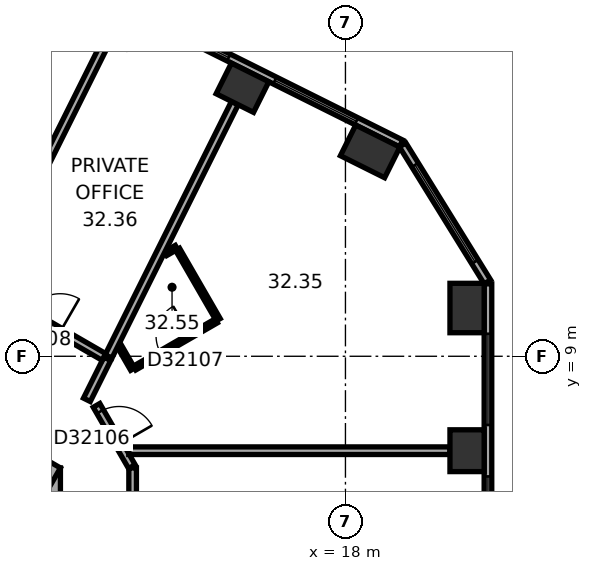
"""IFC4 building model, lengths in metres.
Left out: names, types, materials, properties, quantities, classifications, styles, units other than length and angle.
Written with IfcOpenShell. Run it as: python <this file> out.ifc"""

import sys

from ifc_helpers import new_model, si_unit, direction, frame, frame_2d, origin, origin_2d, place, context, subcontext, project, spatial, rectangle, extrude, element, fill, save


model = new_model("IFC4")
c1 = context("Model", 3, precision=1e-05, world=origin(), true_north=direction((0.0, 1.0)))
c2 = subcontext(c1, "Body", "Model", "MODEL_VIEW")
j1 = project(units=[si_unit("LENGTHUNIT", "METRE"), si_unit("PLANEANGLEUNIT", "RADIAN")], contexts=[c1])
p1 = place(None, origin())
s1 = spatial("IfcSite", under=j1, at=p1, CompositionType="ELEMENT")
p2 = place(p1, origin())
s2 = spatial("IfcBuilding", under=s1, at=p2, CompositionType="ELEMENT")
p3 = place(p2, frame((0.0, 0.0, 131.8)))
s3 = spatial("IfcBuildingStorey", under=s2, at=p3, CompositionType="ELEMENT", Elevation=131.8)
p4 = place(p3, frame((21.2, 6.515, 0.0), z_axis=(0.0, 0.0, 1.0), x_axis=(0.0, 1.0, 0.0)))
e1 = element("IfcColumn", 1, at=p4, inside=s3, PredefinedType="COLUMN", context=c2, shape_type="SweptSolid", body=[
    extrude(rectangle(XDim=1.1, YDim=0.9, at=origin_2d()), origin(), (0.0, 0.0, 1.0), 3.7),
])
for number, where, z_axis, x_axis in (
    (2, (21.2, 10.27, 0.0), (0.0, 0.0, 1.0), (0.0, 1.0, 0.0)),
    (3, (18.65, 14.39, 0.0), (0.0, 0.0, 1.0), (-0.895, 0.446, 0.0)),
):
    element("IfcColumn", number, at=place(p3, frame(where, z_axis=z_axis, x_axis=x_axis)), inside=s3, PredefinedType="COLUMN", context=c2, shape_type="SweptSolid", body=[
        extrude(rectangle(XDim=1.3, YDim=0.9, at=origin_2d()), origin(), (0.0, 0.0, 1.0), 3.7),
    ])
p5 = place(p3, frame((15.29, 16.065, 0.0), z_axis=(0.0, 0.0, 1.0), x_axis=(-0.894934361602, 0.44619781311, 0.0)))
e4 = element("IfcColumn", 4, at=p5, inside=s3, PredefinedType="COLUMN", context=c2, shape_type="SweptSolid", body=[
    extrude(rectangle(XDim=1.1, YDim=0.9, at=origin_2d()), origin(), (0.0, 0.0, 1.0), 3.7),
])
p6 = place(p3, frame((10.0, -6.062, 0.0), z_axis=(0.0, 0.0, 1.0), x_axis=(0.0, 1.0, 0.0)))
e5 = element("IfcWall", 5, at=p6, inside=s3, PredefinedType="SHEAR", context=c2, shape_type="SweptSolid", body=[
    extrude(rectangle(XDim=12.125, YDim=1.0, at=frame_2d((6.062, 0.0))), origin(), (0.0, 0.0, 1.0), 3.7),
])
p7 = place(p6, frame((6.262, 0.0, 0.0)))
e6 = element("IfcOpeningElement", 6, at=p7, cuts=e5, PredefinedType="OPENING", context=c2, shape_type="SweptSolid", body=[
    extrude(rectangle(XDim=1.5, YDim=2.1, at=frame_2d((0.75, 1.05))), frame((0.0, 0.51, 0.0), z_axis=(0.0, -1.0, 0.0), x_axis=(1.0, 0.0, 0.0)), (0.0, 0.0, 1.0), 1.02),
])
p8 = place(p6, frame((1.712, 0.0, 0.0)))
e7 = element("IfcOpeningElement", 7, at=p8, cuts=e5, PredefinedType="OPENING", context=c2, shape_type="SweptSolid", body=[
    extrude(rectangle(XDim=1.1, YDim=2.1, at=frame_2d((0.55, 1.05))), frame((0.0, 0.51, 0.0), z_axis=(0.0, -1.0, 0.0), x_axis=(1.0, 0.0, 0.0)), (0.0, 0.0, 1.0), 1.02),
])
p9 = place(p6, frame((4.312, 0.0, 0.0)))
e8 = element("IfcOpeningElement", 8, at=p9, cuts=e5, PredefinedType="OPENING", context=c2, shape_type="SweptSolid", body=[
    extrude(rectangle(XDim=1.1, YDim=2.1, at=frame_2d((0.55, 1.05))), frame((0.0, 0.51, 0.0), z_axis=(0.0, -1.0, 0.0), x_axis=(1.0, 0.0, 0.0)), (0.0, 0.0, 1.0), 1.02),
])
p10 = place(p3, frame((10.25, 5.629, 0.0), z_axis=(0.0, 0.0, 1.0), x_axis=(-0.866022616891, 0.50000482701, 0.0)))
e9 = element("IfcWall", 9, at=p10, inside=s3, PredefinedType="SHEAR", context=c2, shape_type="SweptSolid", body=[
    extrude(rectangle(XDim=12.125, YDim=1.0, at=frame_2d((6.062, 0.0))), origin(), (0.0, 0.0, 1.0), 3.7),
])
p11 = place(p10, frame((2.612, 0.0, 0.0)))
e10 = element("IfcOpeningElement", 10, at=p11, cuts=e9, PredefinedType="OPENING", context=c2, shape_type="SweptSolid", body=[
    extrude(rectangle(XDim=1.1, YDim=2.1, at=frame_2d((0.55, 1.05))), frame((0.0, 0.51, 0.0), z_axis=(0.0, -1.0, 0.0), x_axis=(1.0, 0.0, 0.0)), (0.0, 0.0, 1.0), 1.02),
])
p12 = place(p10, frame((5.212, 0.0, 0.0)))
e11 = element("IfcOpeningElement", 11, at=p12, cuts=e9, PredefinedType="OPENING", context=c2, shape_type="SweptSolid", body=[
    extrude(rectangle(XDim=1.1, YDim=2.1, at=frame_2d((0.55, 1.05))), frame((0.0, 0.51, 0.0), z_axis=(0.0, -1.0, 0.0), x_axis=(1.0, 0.0, 0.0)), (0.0, 0.0, 1.0), 1.02),
])
p13 = place(p10, frame((7.812, 0.0, 0.0)))
e12 = element("IfcOpeningElement", 12, at=p13, cuts=e9, PredefinedType="OPENING", context=c2, shape_type="SweptSolid", body=[
    extrude(rectangle(XDim=1.1, YDim=2.1, at=frame_2d((0.55, 1.05))), frame((0.0, 0.51, 0.0), z_axis=(0.0, -1.0, 0.0), x_axis=(1.0, 0.0, 0.0)), (0.0, 0.0, 1.0), 1.02),
])
p14 = place(p3, frame((21.75, -9.138, 0.0), z_axis=(0.0, 0.0, 1.0), x_axis=(0.0, 1.0, 0.0)))
e13 = element("IfcWall", 13, at=p14, inside=s3, PredefinedType="STANDARD", context=c2, shape_type="SweptSolid", body=[
    extrude(rectangle(XDim=20.044, YDim=0.2, at=frame_2d((10.022, 0.0))), origin(), (0.0, 0.0, 1.0), 3.7),
])
p15 = place(p14, frame((1.314, 0.0, 0.9)))
e14 = element("IfcOpeningElement", 14, at=p15, cuts=e13, PredefinedType="OPENING", context=c2, shape_type="SweptSolid", body=[
    extrude(rectangle(XDim=2.4, YDim=2.0, at=frame_2d((1.2, 1.0))), frame((0.0, 0.11, 0.0), z_axis=(0.0, -1.0, 0.0), x_axis=(1.0, 0.0, 0.0)), (0.0, 0.0, 1.0), 0.22),
])
p16 = place(p14, frame((5.069, 0.0, 0.9)))
e15 = element("IfcOpeningElement", 15, at=p16, cuts=e13, PredefinedType="OPENING", context=c2, shape_type="SweptSolid", body=[
    extrude(rectangle(XDim=2.4, YDim=2.0, at=frame_2d((1.2, 1.0))), frame((0.0, 0.11, 0.0), z_axis=(0.0, -1.0, 0.0), x_axis=(1.0, 0.0, 0.0)), (0.0, 0.0, 1.0), 0.22),
])
p17 = place(p14, frame((8.823, 0.0, 0.9)))
e16 = element("IfcOpeningElement", 16, at=p17, cuts=e13, PredefinedType="OPENING", context=c2, shape_type="SweptSolid", body=[
    extrude(rectangle(XDim=2.4, YDim=2.0, at=frame_2d((1.2, 1.0))), frame((0.0, 0.11, 0.0), z_axis=(0.0, -1.0, 0.0), x_axis=(1.0, 0.0, 0.0)), (0.0, 0.0, 1.0), 0.22),
])
p18 = place(p14, frame((12.577, 0.0, 0.9)))
e17 = element("IfcOpeningElement", 17, at=p18, cuts=e13, PredefinedType="OPENING", context=c2, shape_type="SweptSolid", body=[
    extrude(rectangle(XDim=2.4, YDim=2.0, at=frame_2d((1.2, 1.0))), frame((0.0, 0.11, 0.0), z_axis=(0.0, -1.0, 0.0), x_axis=(1.0, 0.0, 0.0)), (0.0, 0.0, 1.0), 0.22),
])
p19 = place(p14, frame((16.331, 0.0, 0.9)))
e18 = element("IfcOpeningElement", 18, at=p19, cuts=e13, PredefinedType="OPENING", context=c2, shape_type="SweptSolid", body=[
    extrude(rectangle(XDim=2.4, YDim=2.0, at=frame_2d((1.2, 1.0))), frame((0.0, 0.11, 0.0), z_axis=(0.0, -1.0, 0.0), x_axis=(1.0, 0.0, 0.0)), (0.0, 0.0, 1.0), 0.22),
])
p20 = place(p3, frame((21.735, 10.958, 0.0), z_axis=(0.0, 0.0, 1.0), x_axis=(-0.526213807775, 0.850352296702, 0.0)))
e19 = element("IfcWall", 19, at=p20, inside=s3, PredefinedType="STANDARD", context=c2, shape_type="SweptSolid", body=[
    extrude(rectangle(XDim=4.238, YDim=0.2, at=frame_2d((2.119, 0.0))), origin(), (0.0, 0.0, 1.0), 3.7),
])
p21 = place(p20, frame((0.619, 0.0, 0.9)))
e20 = element("IfcOpeningElement", 20, at=p21, cuts=e19, PredefinedType="OPENING", context=c2, shape_type="SweptSolid", body=[
    extrude(rectangle(XDim=3.0, YDim=2.0, at=frame_2d((1.5, 1.0))), frame((0.0, 0.11, 0.0), z_axis=(0.0, -1.0, 0.0), x_axis=(1.0, 0.0, 0.0)), (0.0, 0.0, 1.0), 0.22),
])
p22 = place(p3, frame((19.464, 14.599, 0.0), z_axis=(0.0, 0.0, 1.0), x_axis=(-0.894935755043, 0.446195018289, 0.0)))
e21 = element("IfcWall", 21, at=p22, inside=s3, PredefinedType="STANDARD", context=c2, shape_type="SweptSolid", body=[
    extrude(rectangle(XDim=20.044, YDim=0.2, at=frame_2d((10.022, 0.0))), origin(), (0.0, 0.0, 1.0), 3.7),
])
p23 = place(p22, frame((1.313, 0.0, 0.9)))
e22 = element("IfcOpeningElement", 22, at=p23, cuts=e21, PredefinedType="OPENING", context=c2, shape_type="SweptSolid", body=[
    extrude(rectangle(XDim=2.4, YDim=2.0, at=frame_2d((1.2, 1.0))), frame((0.0, 0.11, 0.0), z_axis=(0.0, -1.0, 0.0), x_axis=(1.0, 0.0, 0.0)), (0.0, 0.0, 1.0), 0.22),
])
p24 = place(p22, frame((5.067, 0.0, 0.9)))
e23 = element("IfcOpeningElement", 23, at=p24, cuts=e21, PredefinedType="OPENING", context=c2, shape_type="SweptSolid", body=[
    extrude(rectangle(XDim=2.4, YDim=2.0, at=frame_2d((1.2, 1.0))), frame((0.0, 0.11, 0.0), z_axis=(0.0, -1.0, 0.0), x_axis=(1.0, 0.0, 0.0)), (0.0, 0.0, 1.0), 0.22),
])
p25 = place(p22, frame((8.821, 0.0, 0.9)))
e24 = element("IfcOpeningElement", 24, at=p25, cuts=e21, PredefinedType="OPENING", context=c2, shape_type="SweptSolid", body=[
    extrude(rectangle(XDim=2.4, YDim=2.0, at=frame_2d((1.2, 1.0))), frame((0.0, 0.11, 0.0), z_axis=(0.0, -1.0, 0.0), x_axis=(1.0, 0.0, 0.0)), (0.0, 0.0, 1.0), 0.22),
])
p26 = place(p22, frame((12.575, 0.0, 0.9)))
e25 = element("IfcOpeningElement", 25, at=p26, cuts=e21, PredefinedType="OPENING", context=c2, shape_type="SweptSolid", body=[
    extrude(rectangle(XDim=2.4, YDim=2.0, at=frame_2d((1.2, 1.0))), frame((0.0, 0.11, 0.0), z_axis=(0.0, -1.0, 0.0), x_axis=(1.0, 0.0, 0.0)), (0.0, 0.0, 1.0), 0.22),
])
p27 = place(p22, frame((16.329, 0.0, 0.9)))
e26 = element("IfcOpeningElement", 26, at=p27, cuts=e21, PredefinedType="OPENING", context=c2, shape_type="SweptSolid", body=[
    extrude(rectangle(XDim=2.4, YDim=2.0, at=frame_2d((1.2, 1.0))), frame((0.0, 0.11, 0.0), z_axis=(0.0, -1.0, 0.0), x_axis=(1.0, 0.0, 0.0)), (0.0, 0.0, 1.0), 0.22),
])
p28 = place(p3, frame((11.196, 7.854, 0.0), z_axis=(0.0, 0.0, 1.0), x_axis=(0.446241040303, 0.894912808015, 0.0)))
e27 = element("IfcWall", 27, at=p28, inside=s3, PredefinedType="PARTITIONING", context=c2, shape_type="SweptSolid", body=[
    extrude(rectangle(XDim=1.205, YDim=0.2, at=frame_2d((0.603, 0.0))), origin(), (0.0, 0.0, 1.0), 3.42),
])
p29 = place(p3, frame((11.646, 8.981, 0.0), z_axis=(0.0, 0.0, 1.0), x_axis=(-0.866027142779, 0.499996987961, 0.0)))
e28 = element("IfcWall", 28, at=p29, inside=s3, PredefinedType="PARTITIONING", context=c2, shape_type="SweptSolid", body=[
    extrude(rectangle(XDim=9.597, YDim=0.2, at=frame_2d((4.798, 0.0))), origin(), (0.0, 0.0, 1.0), 3.42),
])
p30 = place(p29, frame((1.331, 0.0, 0.0)))
e29 = element("IfcOpeningElement", 29, at=p30, cuts=e28, PredefinedType="OPENING", context=c2, shape_type="SweptSolid", body=[
    extrude(rectangle(XDim=1.0, YDim=2.1, at=frame_2d((0.5, 1.05))), frame((0.0, 0.11, 0.0), z_axis=(0.0, -1.0, 0.0), x_axis=(1.0, 0.0, 0.0)), (0.0, 0.0, 1.0), 0.22),
])
p31 = place(p29, frame((5.042, 0.0, 0.0)))
e30 = element("IfcOpeningElement", 30, at=p31, cuts=e28, PredefinedType="OPENING", context=c2, shape_type="SweptSolid", body=[
    extrude(rectangle(XDim=1.0, YDim=2.1, at=frame_2d((0.5, 1.05))), frame((0.0, 0.11, 0.0), z_axis=(0.0, -1.0, 0.0), x_axis=(1.0, 0.0, 0.0)), (0.0, 0.0, 1.0), 0.22),
])
p32 = place(p29, frame((8.01, 0.0, 0.0)))
e31 = element("IfcOpeningElement", 31, at=p32, cuts=e28, PredefinedType="OPENING", context=c2, shape_type="SweptSolid", body=[
    extrude(rectangle(XDim=1.0, YDim=2.1, at=frame_2d((0.5, 1.05))), frame((0.0, 0.11, 0.0), z_axis=(0.0, -1.0, 0.0), x_axis=(1.0, 0.0, 0.0)), (0.0, 0.0, 1.0), 0.22),
])
p33 = place(p3, frame((11.73, 17.338, 0.0), z_axis=(0.0, 0.0, 1.0), x_axis=(-0.446193589186, -0.894936467561, 0.0)))
e32 = element("IfcWall", 32, at=p33, inside=s3, PredefinedType="PARTITIONING", context=c2, shape_type="SweptSolid", body=[
    extrude(rectangle(XDim=7.183, YDim=0.2, at=frame_2d((3.591, 0.0))), origin(), (0.0, 0.0, 1.0), 2.87),
])
p34 = place(p3, frame((12.38, 6.097, 0.0), z_axis=(0.0, 0.0, 1.0), x_axis=(-0.499964847546, 0.866045698112, 0.0)))
e33 = element("IfcWall", 33, at=p34, inside=s3, PredefinedType="PARTITIONING", context=c2, shape_type="SweptSolid", body=[
    extrude(rectangle(XDim=1.86, YDim=0.2, at=frame_2d((0.93, 0.0))), origin(), (0.0, 0.0, 1.0), 3.42),
])
p35 = place(p34, frame((0.672, 0.0, 0.0)))
e34 = element("IfcOpeningElement", 34, at=p35, cuts=e33, PredefinedType="OPENING", context=c2, shape_type="SweptSolid", body=[
    extrude(rectangle(XDim=1.0, YDim=2.1, at=frame_2d((0.5, 1.05))), frame((0.0, 0.11, 0.0), z_axis=(0.0, -1.0, 0.0), x_axis=(1.0, 0.0, 0.0)), (0.0, 0.0, 1.0), 0.22),
])
p36 = place(p3, frame((12.4, 0.201, 0.0), z_axis=(0.0, 0.0, 1.0), x_axis=(0.0, 1.0, 0.0)))
e35 = element("IfcWall", 35, at=p36, inside=s3, PredefinedType="PARTITIONING", context=c2, shape_type="SweptSolid", body=[
    extrude(rectangle(XDim=5.861, YDim=0.2, at=frame_2d((2.931, 0.0))), origin(), (0.0, 0.0, 1.0), 3.42),
])
p37 = place(p36, frame((3.711, 0.0, 0.0)))
e36 = element("IfcOpeningElement", 36, at=p37, cuts=e35, PredefinedType="OPENING", context=c2, shape_type="SweptSolid", body=[
    extrude(rectangle(XDim=1.0, YDim=2.1, at=frame_2d((0.5, 1.05))), frame((0.0, 0.11, 0.0), z_axis=(0.0, -1.0, 0.0), x_axis=(1.0, 0.0, 0.0)), (0.0, 0.0, 1.0), 0.22),
])
p38 = place(p3, frame((12.401, 8.661, 0.0), z_axis=(0.0, 0.0, 1.0), x_axis=(-0.499831418649, 0.866122712398, 0.0)))
e37 = element("IfcWall", 37, at=p38, inside=s3, PredefinedType="PARTITIONING", context=c2, shape_type="SweptSolid", body=[
    extrude(rectangle(XDim=0.711, YDim=0.12, at=frame_2d((0.355, 0.0))), origin(), (0.0, 0.0, 1.0), 3.42),
])
p39 = place(p3, frame((13.269, 11.702, 0.0), z_axis=(0.0, 0.0, 1.0), x_axis=(0.865936922628, 0.500153222552, 0.0)))
e38 = element("IfcWall", 38, at=p39, inside=s3, PredefinedType="PARTITIONING", context=c2, shape_type="SweptSolid", body=[
    extrude(rectangle(XDim=0.327, YDim=0.12, at=frame_2d((0.164, 0.0))), origin(), (0.0, 0.0, 1.0), 3.42),
])
p40 = place(p3, frame((13.583, 11.814, 0.0), z_axis=(0.0, 0.0, 1.0), x_axis=(0.500028586798, -0.86600889856, 0.0)))
e39 = element("IfcWall", 39, at=p40, inside=s3, PredefinedType="PARTITIONING", context=c2, shape_type="SweptSolid", body=[
    extrude(rectangle(XDim=2.14, YDim=0.12, at=frame_2d((1.07, 0.0))), origin(), (0.0, 0.0, 1.0), 3.42),
])
p41 = place(p3, frame((14.601, 9.931, 0.0), z_axis=(0.0, 0.0, 1.0), x_axis=(-0.866023285932, -0.50000366821, 0.0)))
e40 = element("IfcWall", 40, at=p41, inside=s3, PredefinedType="PARTITIONING", context=c2, shape_type="SweptSolid", body=[
    extrude(rectangle(XDim=2.48, YDim=0.12, at=frame_2d((1.24, 0.0))), origin(), (0.0, 0.0, 1.0), 3.42),
])
p42 = place(p41, frame((0.79, 0.0, 0.0)))
e41 = element("IfcOpeningElement", 41, at=p42, cuts=e40, PredefinedType="OPENING", context=c2, shape_type="SweptSolid", body=[
    extrude(rectangle(XDim=0.9, YDim=2.1, at=frame_2d((0.45, 1.05))), frame((0.0, 0.07, 0.0), z_axis=(0.0, -1.0, 0.0), x_axis=(1.0, 0.0, 0.0)), (0.0, 0.0, 1.0), 0.14),
])
p43 = place(p3, frame((15.09, 15.663, 0.0), z_axis=(0.0, 0.0, 1.0), x_axis=(-0.446203977428, -0.89493128816, 0.0)))
e42 = element("IfcWall", 42, at=p43, inside=s3, PredefinedType="PARTITIONING", context=c2, shape_type="SweptSolid", body=[
    extrude(rectangle(XDim=7.45, YDim=0.2, at=frame_2d((3.725, 0.0))), origin(), (0.0, 0.0, 1.0), 3.42),
])
p44 = place(p3, frame((20.75, 6.515, 0.0), z_axis=(0.0, 0.0, 1.0), x_axis=(-1.0, 0.0, 0.0)))
e43 = element("IfcWall", 43, at=p44, inside=s3, PredefinedType="PARTITIONING", context=c2, shape_type="SweptSolid", body=[
    extrude(rectangle(XDim=8.452, YDim=0.2, at=frame_2d((4.226, 0.0))), origin(), (0.0, 0.0, 1.0), 3.42),
])
p45 = place(p18, origin())
e44 = element("IfcWindow", 44, at=p45, inside=s3, PartitioningType="SINGLE_PANEL", PredefinedType="WINDOW", context=c2, shape_type="SweptSolid", body=[
    extrude(rectangle(XDim=2.4, YDim=2.0, at=frame_2d((1.2, 1.0))), frame((0.0, 0.03, 0.0), z_axis=(0.0, -1.0, 0.0), x_axis=(1.0, 0.0, 0.0)), (0.0, 0.0, 1.0), 0.06),
])
fill(e17, e44)
p46 = place(p19, origin())
e45 = element("IfcWindow", 45, at=p46, inside=s3, PartitioningType="SINGLE_PANEL", PredefinedType="WINDOW", context=c2, shape_type="SweptSolid", body=[
    extrude(rectangle(XDim=2.4, YDim=2.0, at=frame_2d((1.2, 1.0))), frame((0.0, 0.03, 0.0), z_axis=(0.0, -1.0, 0.0), x_axis=(1.0, 0.0, 0.0)), (0.0, 0.0, 1.0), 0.06),
])
fill(e18, e45)
p47 = place(p21, origin())
e46 = element("IfcWindow", 46, at=p47, inside=s3, PartitioningType="SINGLE_PANEL", PredefinedType="WINDOW", context=c2, shape_type="SweptSolid", body=[
    extrude(rectangle(XDim=3.0, YDim=2.0, at=frame_2d((1.5, 1.0))), frame((0.0, 0.03, 0.0), z_axis=(0.0, -1.0, 0.0), x_axis=(1.0, 0.0, 0.0)), (0.0, 0.0, 1.0), 0.06),
])
fill(e20, e46)
p48 = place(p23, origin())
e47 = element("IfcWindow", 47, at=p48, inside=s3, PartitioningType="SINGLE_PANEL", PredefinedType="WINDOW", context=c2, shape_type="SweptSolid", body=[
    extrude(rectangle(XDim=2.4, YDim=2.0, at=frame_2d((1.2, 1.0))), frame((0.0, 0.03, 0.0), z_axis=(0.0, -1.0, 0.0), x_axis=(1.0, 0.0, 0.0)), (0.0, 0.0, 1.0), 0.06),
])
fill(e22, e47)
p49 = place(p24, origin())
e48 = element("IfcWindow", 48, at=p49, inside=s3, PartitioningType="SINGLE_PANEL", PredefinedType="WINDOW", context=c2, shape_type="SweptSolid", body=[
    extrude(rectangle(XDim=2.4, YDim=2.0, at=frame_2d((1.2, 1.0))), frame((0.0, 0.03, 0.0), z_axis=(0.0, -1.0, 0.0), x_axis=(1.0, 0.0, 0.0)), (0.0, 0.0, 1.0), 0.06),
])
fill(e23, e48)
p50 = place(p35, origin())
e49 = element("IfcDoor", 49, at=p50, inside=s3, OperationType="SINGLE_SWING_LEFT", PredefinedType="DOOR", context=c2, shape_type="SweptSolid", body=[
    extrude(rectangle(XDim=1.0, YDim=2.1, at=frame_2d((0.5, 1.05))), frame((0.0, 0.025, 0.0), z_axis=(0.0, -1.0, 0.0), x_axis=(1.0, 0.0, 0.0)), (0.0, 0.0, 1.0), 0.05),
])
fill(e34, e49)
p51 = place(p42, origin())
e50 = element("IfcDoor", 50, at=p51, inside=s3, OperationType="SINGLE_SWING_LEFT", PredefinedType="DOOR", context=c2, shape_type="SweptSolid", body=[
    extrude(rectangle(XDim=0.9, YDim=2.1, at=frame_2d((0.45, 1.05))), frame((0.0, 0.025, 0.0), z_axis=(0.0, -1.0, 0.0), x_axis=(1.0, 0.0, 0.0)), (0.0, 0.0, 1.0), 0.05),
])
fill(e41, e50)
p52 = place(p30, origin())
e51 = element("IfcDoor", 51, at=p52, inside=s3, OperationType="SINGLE_SWING_LEFT", PredefinedType="DOOR", context=c2, shape_type="SweptSolid", body=[
    extrude(rectangle(XDim=1.0, YDim=2.1, at=frame_2d((0.5, 1.05))), frame((0.0, 0.025, 0.0), z_axis=(0.0, -1.0, 0.0), x_axis=(1.0, 0.0, 0.0)), (0.0, 0.0, 1.0), 0.05),
])
fill(e29, e51)
save(model, sys.argv[1])
